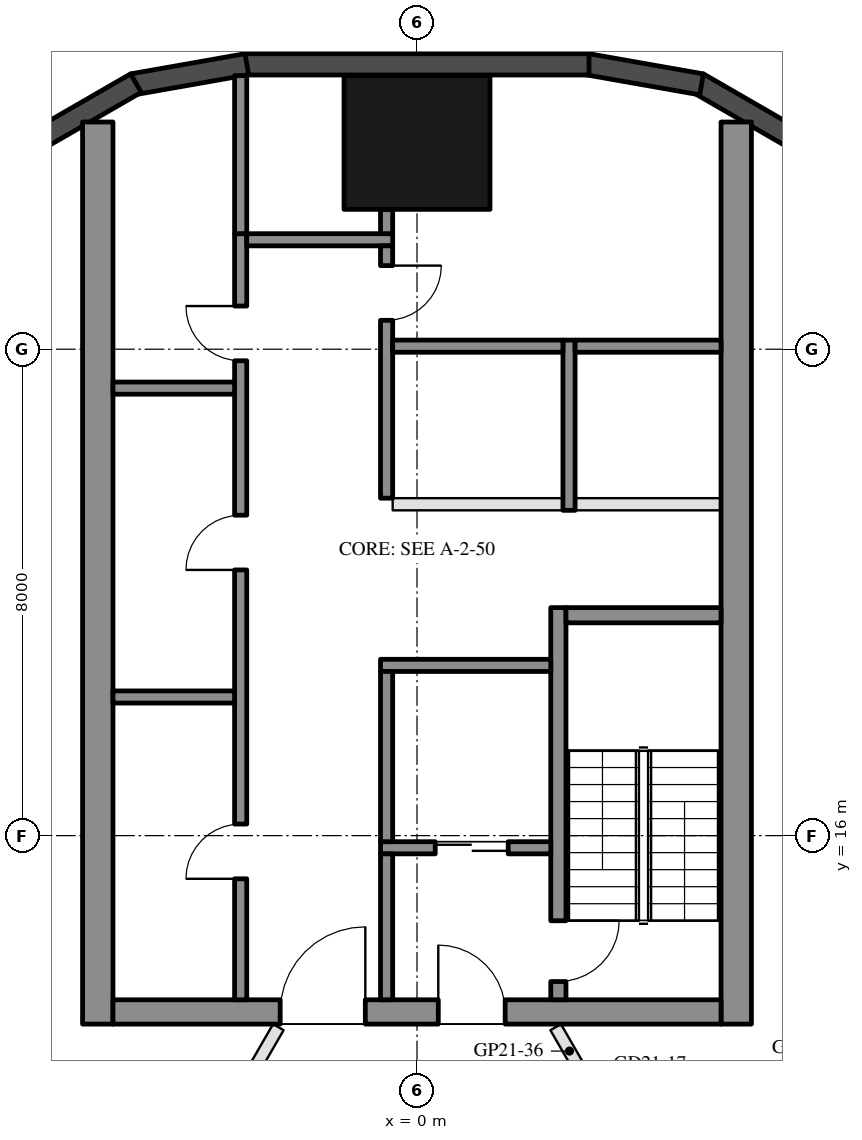
"""IFC4 building model, lengths in metres.
Left out: names, types, materials, properties, quantities, classifications, styles, units other than length and angle.
Written with IfcOpenShell. Run it as: python <this file> out.ifc"""

import sys

from ifc_helpers import new_model, si_unit, direction, frame, frame_2d, origin, origin_2d, place, context, subcontext, project, spatial, rectangle, hollow_rectangle, extrude, element, fill, save


model = new_model("IFC4")
c1 = context("Model", 3, precision=1e-05, world=origin(), true_north=direction((0.0, 1.0)))
c2 = subcontext(c1, "Body", "Model", "MODEL_VIEW")
j1 = project(units=[si_unit("LENGTHUNIT", "METRE"), si_unit("PLANEANGLEUNIT", "RADIAN")], contexts=[c1])
p1 = place(None, origin())
s1 = spatial("IfcSite", under=j1, at=p1, CompositionType="ELEMENT")
p2 = place(p1, origin())
s2 = spatial("IfcBuilding", under=s1, at=p2, CompositionType="ELEMENT")
p3 = place(p2, frame((0.0, 0.0, 216.9)))
s3 = spatial("IfcBuildingStorey", under=s2, at=p3, CompositionType="ELEMENT", Elevation=216.9)
p4 = place(p3, frame((0.0, 27.4, 0.0), z_axis=(0.0, 0.0, 1.0), x_axis=(1.0, 0.0, 0.0)))
e1 = element("IfcColumn", 1, at=p4, inside=s3, PredefinedType="COLUMN", context=c2, shape_type="SweptSolid", body=[
    extrude(hollow_rectangle(XDim=2.4, YDim=2.2, WallThickness=0.06, at=origin_2d()), origin(), (0.0, 0.0, 1.0), 3.7),
])
for number, where, z_axis, x_axis in (
    (2, (6.277, 27.422, 0.0), (0.0, 0.0, 1.0), (-0.866, 0.5, 0.0)),
    (3, (4.68, 28.356, 0.0), (0.0, 0.0, 1.0), (-0.985, 0.174, 0.0)),
):
    element("IfcWall", number, at=place(p3, frame(where, z_axis=z_axis, x_axis=x_axis)), inside=s3, PredefinedType="SOLIDWALL", context=c2, shape_type="SweptSolid", body=[
        extrude(rectangle(XDim=1.91, YDim=0.35, at=frame_2d((0.955, 0.0))), origin(), (0.0, 0.0, 1.0), 3.55),
    ])
p5 = place(p3, frame((2.829, 28.685, 0.0), z_axis=(0.0, 0.0, 1.0), x_axis=(-1.0, 0.0, 0.0)))
e4 = element("IfcWall", 4, at=p5, inside=s3, PredefinedType="SOLIDWALL", context=c2, shape_type="SweptSolid", body=[
    extrude(rectangle(XDim=5.658, YDim=0.35, at=frame_2d((2.829, 0.0))), origin(), (0.0, 0.0, 1.0), 3.55),
])
for number, where, z_axis, x_axis in (
    (5, (-2.799, 28.688, 0.0), (0.0, 0.0, 1.0), (-0.985, -0.174, 0.0)),
    (6, (-4.623, 28.377, 0.0), (0.0, 0.0, 1.0), (-0.866, -0.5, 0.0)),
):
    element("IfcWall", number, at=place(p3, frame(where, z_axis=z_axis, x_axis=x_axis)), inside=s3, PredefinedType="SOLIDWALL", context=c2, shape_type="SweptSolid", body=[
        extrude(rectangle(XDim=1.91, YDim=0.35, at=frame_2d((0.955, 0.0))), origin(), (0.0, 0.0, 1.0), 3.55),
    ])
for number, where, z_axis, x_axis in (
    (7, (5.25, 12.9, 0.0), (0.0, 0.0, 1.0), (0.0, 1.0, 0.0)),
    (8, (-5.25, 12.9, 0.0), (0.0, 0.0, 1.0), (0.0, 1.0, 0.0)),
):
    element("IfcWall", number, at=place(p3, frame(where, z_axis=z_axis, x_axis=x_axis)), inside=s3, PredefinedType="SHEAR", context=c2, shape_type="SweptSolid", body=[
        extrude(rectangle(XDim=14.837, YDim=0.5, at=frame_2d((7.418, 0.0))), origin(), (0.0, 0.0, 1.0), 3.5),
    ])
p6 = place(p3, frame((5.0, 13.1, 0.0), z_axis=(0.0, 0.0, 1.0), x_axis=(-1.0, 0.0, 0.0)))
e9 = element("IfcWall", 9, at=p6, inside=s3, PredefinedType="SHEAR", context=c2, shape_type="SweptSolid", body=[
    extrude(rectangle(XDim=10.0, YDim=0.4, at=frame_2d((5.0, 0.0))), origin(), (0.0, 0.0, 1.0), 3.5),
])
p7 = place(p6, frame((3.55, 0.0, 0.0)))
e10 = element("IfcOpeningElement", 10, at=p7, cuts=e9, PredefinedType="OPENING", context=c2, shape_type="SweptSolid", body=[
    extrude(rectangle(XDim=1.1, YDim=2.1, at=frame_2d((0.55, 1.05))), frame((0.0, 0.21, 0.0), z_axis=(0.0, -1.0, 0.0), x_axis=(1.0, 0.0, 0.0)), (0.0, 0.0, 1.0), 0.42),
])
p8 = place(p6, frame((5.85, 0.0, 0.0)))
e11 = element("IfcOpeningElement", 11, at=p8, cuts=e9, PredefinedType="OPENING", context=c2, shape_type="SweptSolid", body=[
    extrude(rectangle(XDim=1.4, YDim=2.1, at=frame_2d((0.7, 1.05))), frame((0.0, 0.21, 0.0), z_axis=(0.0, -1.0, 0.0), x_axis=(1.0, 0.0, 0.0)), (0.0, 0.0, 1.0), 0.42),
])
p9 = place(p3, frame((2.325, 13.3, 0.0), z_axis=(0.0, 0.0, 1.0), x_axis=(0.0, 1.0, 0.0)))
e12 = element("IfcWall", 12, at=p9, inside=s3, PredefinedType="SHEAR", context=c2, shape_type="SweptSolid", body=[
    extrude(rectangle(XDim=6.45, YDim=0.25, at=frame_2d((3.225, 0.0))), origin(), (0.0, 0.0, 1.0), 3.5),
])
p10 = place(p9, frame((0.3, 0.0, 0.0)))
e13 = element("IfcOpeningElement", 13, at=p10, cuts=e12, PredefinedType="OPENING", context=c2, shape_type="SweptSolid", body=[
    extrude(rectangle(XDim=1.0, YDim=2.1, at=frame_2d((0.5, 1.05))), frame((0.0, 0.135, 0.0), z_axis=(0.0, -1.0, 0.0), x_axis=(1.0, 0.0, 0.0)), (0.0, 0.0, 1.0), 0.27),
])
p11 = place(p3, frame((5.0, 19.625, 0.0), z_axis=(0.0, 0.0, 1.0), x_axis=(-1.0, 0.0, 0.0)))
e14 = element("IfcWall", 14, at=p11, inside=s3, PredefinedType="SHEAR", context=c2, shape_type="SweptSolid", body=[
    extrude(rectangle(XDim=2.55, YDim=0.25, at=frame_2d((1.275, 0.0))), origin(), (0.0, 0.0, 1.0), 3.5),
])
p12 = place(p3, frame((2.2, 18.8, 0.0), z_axis=(0.0, 0.0, 1.0), x_axis=(-1.0, 0.0, 0.0)))
e15 = element("IfcWall", 15, at=p12, inside=s3, PredefinedType="SHEAR", context=c2, shape_type="SweptSolid", body=[
    extrude(rectangle(XDim=2.8, YDim=0.2, at=frame_2d((1.4, 0.0))), origin(), (0.0, 0.0, 1.0), 3.5),
])
p13 = place(p3, frame((2.2, 15.8, 0.0), z_axis=(0.0, 0.0, 1.0), x_axis=(-1.0, 0.0, 0.0)))
e16 = element("IfcWall", 16, at=p13, inside=s3, PredefinedType="SHEAR", context=c2, shape_type="SweptSolid", body=[
    extrude(rectangle(XDim=2.8, YDim=0.2, at=frame_2d((1.4, 0.0))), origin(), (0.0, 0.0, 1.0), 3.5),
])
p14 = place(p13, frame((0.7, 0.0, 0.0)))
e17 = element("IfcOpeningElement", 17, at=p14, cuts=e16, PredefinedType="OPENING", context=c2, shape_type="SweptSolid", body=[
    extrude(rectangle(XDim=1.2, YDim=2.1, at=frame_2d((0.6, 1.05))), frame((0.0, 0.11, 0.0), z_axis=(0.0, -1.0, 0.0), x_axis=(1.0, 0.0, 0.0)), (0.0, 0.0, 1.0), 0.22),
])
p15 = place(p3, frame((-0.5, 15.9, 0.0), z_axis=(0.0, 0.0, 1.0), x_axis=(0.0, 1.0, 0.0)))
e18 = element("IfcWall", 18, at=p15, inside=s3, PredefinedType="SHEAR", context=c2, shape_type="SweptSolid", body=[
    extrude(rectangle(XDim=2.8, YDim=0.2, at=frame_2d((1.4, 0.0))), origin(), (0.0, 0.0, 1.0), 3.5),
])
p16 = place(p3, frame((-0.5, 13.3, 0.0), z_axis=(0.0, 0.0, 1.0), x_axis=(0.0, 1.0, 0.0)))
e19 = element("IfcWall", 19, at=p16, inside=s3, PredefinedType="SHEAR", context=c2, shape_type="SweptSolid", body=[
    extrude(rectangle(XDim=2.4, YDim=0.2, at=frame_2d((1.2, 0.0))), origin(), (0.0, 0.0, 1.0), 3.5),
])
p17 = place(p3, frame((-2.9, 13.3, 0.0), z_axis=(0.0, 0.0, 1.0), x_axis=(0.0, 1.0, 0.0)))
e20 = element("IfcWall", 20, at=p17, inside=s3, PredefinedType="SHEAR", context=c2, shape_type="SweptSolid", body=[
    extrude(rectangle(XDim=12.6, YDim=0.2, at=frame_2d((6.3, 0.0))), origin(), (0.0, 0.0, 1.0), 3.5),
])
p18 = place(p17, frame((1.99, 0.0, 0.0)))
e21 = element("IfcOpeningElement", 21, at=p18, cuts=e20, PredefinedType="OPENING", context=c2, shape_type="SweptSolid", body=[
    extrude(rectangle(XDim=0.9, YDim=2.1, at=frame_2d((0.45, 1.05))), frame((0.0, 0.11, 0.0), z_axis=(0.0, -1.0, 0.0), x_axis=(1.0, 0.0, 0.0)), (0.0, 0.0, 1.0), 0.22),
])
p19 = place(p17, frame((7.07, 0.0, 0.0)))
e22 = element("IfcOpeningElement", 22, at=p19, cuts=e20, PredefinedType="OPENING", context=c2, shape_type="SweptSolid", body=[
    extrude(rectangle(XDim=0.9, YDim=2.1, at=frame_2d((0.45, 1.05))), frame((0.0, 0.11, 0.0), z_axis=(0.0, -1.0, 0.0), x_axis=(1.0, 0.0, 0.0)), (0.0, 0.0, 1.0), 0.22),
])
p20 = place(p17, frame((10.51, 0.0, 0.0)))
e23 = element("IfcOpeningElement", 23, at=p20, cuts=e20, PredefinedType="OPENING", context=c2, shape_type="SweptSolid", body=[
    extrude(rectangle(XDim=0.9, YDim=2.1, at=frame_2d((0.45, 1.05))), frame((0.0, 0.11, 0.0), z_axis=(0.0, -1.0, 0.0), x_axis=(1.0, 0.0, 0.0)), (0.0, 0.0, 1.0), 0.22),
])
p21 = place(p3, frame((-0.4, 25.8, 0.0), z_axis=(0.0, 0.0, 1.0), x_axis=(-1.0, 0.0, 0.0)))
e24 = element("IfcWall", 24, at=p21, inside=s3, PredefinedType="SHEAR", context=c2, shape_type="SweptSolid", body=[
    extrude(rectangle(XDim=2.4, YDim=0.2, at=frame_2d((1.2, 0.0))), origin(), (0.0, 0.0, 1.0), 3.5),
])
p22 = place(p3, frame((-0.5, 21.55, 0.0), z_axis=(0.0, 0.0, 1.0), x_axis=(0.0, 1.0, 0.0)))
e25 = element("IfcWall", 25, at=p22, inside=s3, PredefinedType="SHEAR", context=c2, shape_type="SweptSolid", body=[
    extrude(rectangle(XDim=4.15, YDim=0.2, at=frame_2d((2.075, 0.0))), origin(), (0.0, 0.0, 1.0), 3.5),
])
p23 = place(p22, frame((2.925, 0.0, 0.0)))
e26 = element("IfcOpeningElement", 26, at=p23, cuts=e25, PredefinedType="OPENING", context=c2, shape_type="SweptSolid", body=[
    extrude(rectangle(XDim=0.9, YDim=2.1, at=frame_2d((0.45, 1.05))), frame((0.0, 0.11, 0.0), z_axis=(0.0, -1.0, 0.0), x_axis=(1.0, 0.0, 0.0)), (0.0, 0.0, 1.0), 0.22),
])
for number, where, z_axis, x_axis in (
    (27, (-3.0, 18.28, 0.0), (0.0, 0.0, 1.0), (-1.0, 0.0, 0.0)),
    (28, (-3.0, 23.36, 0.0), (0.0, 0.0, 1.0), (-1.0, 0.0, 0.0)),
):
    element("IfcWall", number, at=place(p3, frame(where, z_axis=z_axis, x_axis=x_axis)), inside=s3, PredefinedType="SHEAR", context=c2, shape_type="SweptSolid", body=[
        extrude(rectangle(XDim=2.0, YDim=0.2, at=frame_2d((1.0, 0.0))), origin(), (0.0, 0.0, 1.0), 3.5),
    ])
p24 = place(p3, frame((-0.5, 25.9, 0.0), z_axis=(0.0, 0.0, 1.0), x_axis=(0.0, 1.0, 0.0)))
e29 = element("IfcWall", 29, at=p24, inside=s3, PredefinedType="SHEAR", context=c2, shape_type="SweptSolid", body=[
    extrude(rectangle(XDim=0.4, YDim=0.2, at=frame_2d((0.2, 0.0))), origin(), (0.0, 0.0, 1.0), 3.5),
])
p25 = place(p3, frame((-2.9, 25.9, 0.0), z_axis=(0.0, 0.0, 1.0), x_axis=(0.0, 1.0, 0.0)))
e30 = element("IfcWall", 30, at=p25, inside=s3, PredefinedType="SHEAR", context=c2, shape_type="SweptSolid", body=[
    extrude(rectangle(XDim=2.6, YDim=0.2, at=frame_2d((1.3, 0.0))), origin(), (0.0, 0.0, 1.0), 3.5),
])
p26 = place(p3, frame((2.5, 21.35, 0.0), z_axis=(0.0, 0.0, 1.0), x_axis=(0.0, 1.0, 0.0)))
e31 = element("IfcWall", 31, at=p26, inside=s3, PredefinedType="SHEAR", context=c2, shape_type="SweptSolid", body=[
    extrude(rectangle(XDim=2.8, YDim=0.2, at=frame_2d((1.4, 0.0))), origin(), (0.0, 0.0, 1.0), 3.5),
])
p27 = place(p3, frame((5.0, 24.05, 0.0), z_axis=(0.0, 0.0, 1.0), x_axis=(-1.0, 0.0, 0.0)))
e32 = element("IfcWall", 32, at=p27, inside=s3, PredefinedType="SHEAR", context=c2, shape_type="SweptSolid", body=[
    extrude(rectangle(XDim=2.4, YDim=0.2, at=frame_2d((1.2, 0.0))), origin(), (0.0, 0.0, 1.0), 3.5),
])
p28 = place(p3, frame((2.4, 24.05, 0.0), z_axis=(0.0, 0.0, 1.0), x_axis=(-1.0, 0.0, 0.0)))
e33 = element("IfcWall", 33, at=p28, inside=s3, PredefinedType="SHEAR", context=c2, shape_type="SweptSolid", body=[
    extrude(rectangle(XDim=2.8, YDim=0.2, at=frame_2d((1.4, 0.0))), origin(), (0.0, 0.0, 1.0), 3.5),
])
p29 = place(p3, frame((5.0, 21.45, 0.0), z_axis=(0.0, 0.0, 1.0), x_axis=(-1.0, 0.0, 0.0)))
e34 = element("IfcWall", 34, at=p29, inside=s3, PredefinedType="PARTITIONING", context=c2, shape_type="SweptSolid", body=[
    extrude(rectangle(XDim=2.4, YDim=0.2, at=frame_2d((1.2, 0.0))), origin(), (0.0, 0.0, 1.0), 3.5),
])
p30 = place(p3, frame((2.4, 21.45, 0.0), z_axis=(0.0, 0.0, 1.0), x_axis=(-1.0, 0.0, 0.0)))
e35 = element("IfcWall", 35, at=p30, inside=s3, PredefinedType="PARTITIONING", context=c2, shape_type="SweptSolid", body=[
    extrude(rectangle(XDim=2.8, YDim=0.2, at=frame_2d((1.4, 0.0))), origin(), (0.0, 0.0, 1.0), 3.5),
])
p31 = place(p3, frame((13.647, 14.923, 0.0), z_axis=(0.0, 0.0, 1.0), x_axis=(-0.866027479907, -0.499996404033, 0.0)))
e36 = element("IfcWall", 36, at=p31, inside=s3, PredefinedType="PARTITIONING", context=c2, shape_type="SweptSolid", body=[
    extrude(rectangle(XDim=10.98, YDim=0.2, at=frame_2d((5.49, 0.0))), origin(), (0.0, 0.0, 1.0), 3.06),
])
p32 = place(p3, frame((-13.672, 13.08, 0.0), z_axis=(0.0, 0.0, 1.0), x_axis=(0.912311972773, -0.409495866077, 0.0)))
e37 = element("IfcWall", 37, at=p32, inside=s3, PredefinedType="PARTITIONING", context=c2, shape_type="SweptSolid", body=[
    extrude(rectangle(XDim=10.132, YDim=0.2, at=frame_2d((5.066, 0.0))), origin(), (0.0, 0.0, 1.0), 3.06),
])
p33 = place(p3, frame((2.281, 12.85, 0.0), z_axis=(0.0, 0.0, 1.0), x_axis=(0.499979074716, -0.866037484666, 0.0)))
e38 = element("IfcWall", 38, at=p33, inside=s3, PredefinedType="PARTITIONING", context=c2, shape_type="SweptSolid", body=[
    extrude(rectangle(XDim=3.788, YDim=0.2, at=frame_2d((1.894, 0.0))), origin(), (0.0, 0.0, 1.0), 2.95),
])
p34 = place(p33, frame((1.394, 0.0, 0.0)))
e39 = element("IfcOpeningElement", 39, at=p34, cuts=e38, PredefinedType="OPENING", context=c2, shape_type="SweptSolid", body=[
    extrude(rectangle(XDim=1.0, YDim=2.1, at=frame_2d((0.5, 1.05))), frame((0.0, 0.11, 0.0), z_axis=(0.0, -1.0, 0.0), x_axis=(1.0, 0.0, 0.0)), (0.0, 0.0, 1.0), 0.22),
])
p35 = place(p3, frame((-4.469, 9.059, 0.0), z_axis=(0.0, 0.0, 1.0), x_axis=(0.499996027077, 0.86602769754, 0.0)))
e40 = element("IfcWall", 40, at=p35, inside=s3, PredefinedType="PARTITIONING", context=c2, shape_type="SweptSolid", body=[
    extrude(rectangle(XDim=4.377, YDim=0.2, at=frame_2d((2.189, 0.0))), origin(), (0.0, 0.0, 1.0), 2.95),
])
p36 = place(p35, frame((1.689, 0.0, 0.0)))
e41 = element("IfcOpeningElement", 41, at=p36, cuts=e40, PredefinedType="OPENING", context=c2, shape_type="SweptSolid", body=[
    extrude(rectangle(XDim=1.0, YDim=2.1, at=frame_2d((0.5, 1.05))), frame((0.0, 0.11, 0.0), z_axis=(0.0, -1.0, 0.0), x_axis=(1.0, 0.0, 0.0)), (0.0, 0.0, 1.0), 0.22),
])
p37 = place(p14, origin())
e42 = element("IfcDoor", 42, at=p37, inside=s3, OperationType="DOUBLE_DOOR_SLIDING", PredefinedType="DOOR", context=c2, shape_type="SweptSolid", body=[
    extrude(rectangle(XDim=1.2, YDim=2.1, at=frame_2d((0.6, 1.05))), frame((0.0, 0.025, 0.0), z_axis=(0.0, -1.0, 0.0), x_axis=(1.0, 0.0, 0.0)), (0.0, 0.0, 1.0), 0.05),
])
fill(e17, e42)
p38 = place(p18, origin())
e43 = element("IfcDoor", 43, at=p38, inside=s3, OperationType="SINGLE_SWING_LEFT", PredefinedType="DOOR", context=c2, shape_type="SweptSolid", body=[
    extrude(rectangle(XDim=0.9, YDim=2.1, at=frame_2d((0.45, 1.05))), frame((0.0, 0.025, 0.0), z_axis=(0.0, -1.0, 0.0), x_axis=(1.0, 0.0, 0.0)), (0.0, 0.0, 1.0), 0.05),
])
fill(e21, e43)
p39 = place(p19, origin())
e44 = element("IfcDoor", 44, at=p39, inside=s3, OperationType="SINGLE_SWING_LEFT", PredefinedType="DOOR", context=c2, shape_type="SweptSolid", body=[
    extrude(rectangle(XDim=0.9, YDim=2.1, at=frame_2d((0.45, 1.05))), frame((0.0, 0.025, 0.0), z_axis=(0.0, -1.0, 0.0), x_axis=(1.0, 0.0, 0.0)), (0.0, 0.0, 1.0), 0.05),
])
fill(e22, e44)
p40 = place(p20, origin())
e45 = element("IfcDoor", 45, at=p40, inside=s3, OperationType="SINGLE_SWING_RIGHT", PredefinedType="DOOR", context=c2, shape_type="SweptSolid", body=[
    extrude(rectangle(XDim=0.9, YDim=2.1, at=frame_2d((0.45, 1.05))), frame((0.0, 0.025, 0.0), z_axis=(0.0, -1.0, 0.0), x_axis=(1.0, 0.0, 0.0)), (0.0, 0.0, 1.0), 0.05),
])
fill(e23, e45)
p41 = place(p23, frame((0.9, 0.0, 0.0), z_axis=(0.0, 0.0, 1.0), x_axis=(-1.0, 0.0, 0.0)))
e46 = element("IfcDoor", 46, at=p41, inside=s3, OperationType="SINGLE_SWING_LEFT", PredefinedType="DOOR", context=c2, shape_type="SweptSolid", body=[
    extrude(rectangle(XDim=0.9, YDim=2.1, at=frame_2d((0.45, 1.05))), frame((0.0, 0.025, 0.0), z_axis=(0.0, -1.0, 0.0), x_axis=(1.0, 0.0, 0.0)), (0.0, 0.0, 1.0), 0.05),
])
fill(e26, e46)
p42 = place(p7, frame((1.1, 0.0, 0.0), z_axis=(0.0, 0.0, 1.0), x_axis=(-1.0, 0.0, 0.0)))
e47 = element("IfcDoor", 47, at=p42, inside=s3, OperationType="SINGLE_SWING_LEFT", PredefinedType="DOOR", context=c2, shape_type="SweptSolid", body=[
    extrude(rectangle(XDim=1.1, YDim=2.1, at=frame_2d((0.55, 1.05))), frame((0.0, 0.025, 0.0), z_axis=(0.0, -1.0, 0.0), x_axis=(1.0, 0.0, 0.0)), (0.0, 0.0, 1.0), 0.05),
])
fill(e10, e47)
p43 = place(p8, frame((1.4, 0.0, 0.0), z_axis=(0.0, 0.0, 1.0), x_axis=(-1.0, 0.0, 0.0)))
e48 = element("IfcDoor", 48, at=p43, inside=s3, OperationType="DOUBLE_DOOR_SINGLE_SWING", PredefinedType="DOOR", context=c2, shape_type="SweptSolid", body=[
    extrude(rectangle(XDim=1.4, YDim=2.1, at=frame_2d((0.7, 1.05))), frame((0.0, 0.025, 0.0), z_axis=(0.0, -1.0, 0.0), x_axis=(1.0, 0.0, 0.0)), (0.0, 0.0, 1.0), 0.05),
])
fill(e11, e48)
p44 = place(p10, frame((1.0, 0.0, 0.0), z_axis=(0.0, 0.0, 1.0), x_axis=(-1.0, 0.0, 0.0)))
e49 = element("IfcDoor", 49, at=p44, inside=s3, OperationType="SINGLE_SWING_LEFT", PredefinedType="DOOR", context=c2, shape_type="SweptSolid", body=[
    extrude(rectangle(XDim=1.0, YDim=2.1, at=frame_2d((0.5, 1.05))), frame((0.0, 0.025, 0.0), z_axis=(0.0, -1.0, 0.0), x_axis=(1.0, 0.0, 0.0)), (0.0, 0.0, 1.0), 0.05),
])
fill(e13, e49)
save(model, sys.argv[1])
